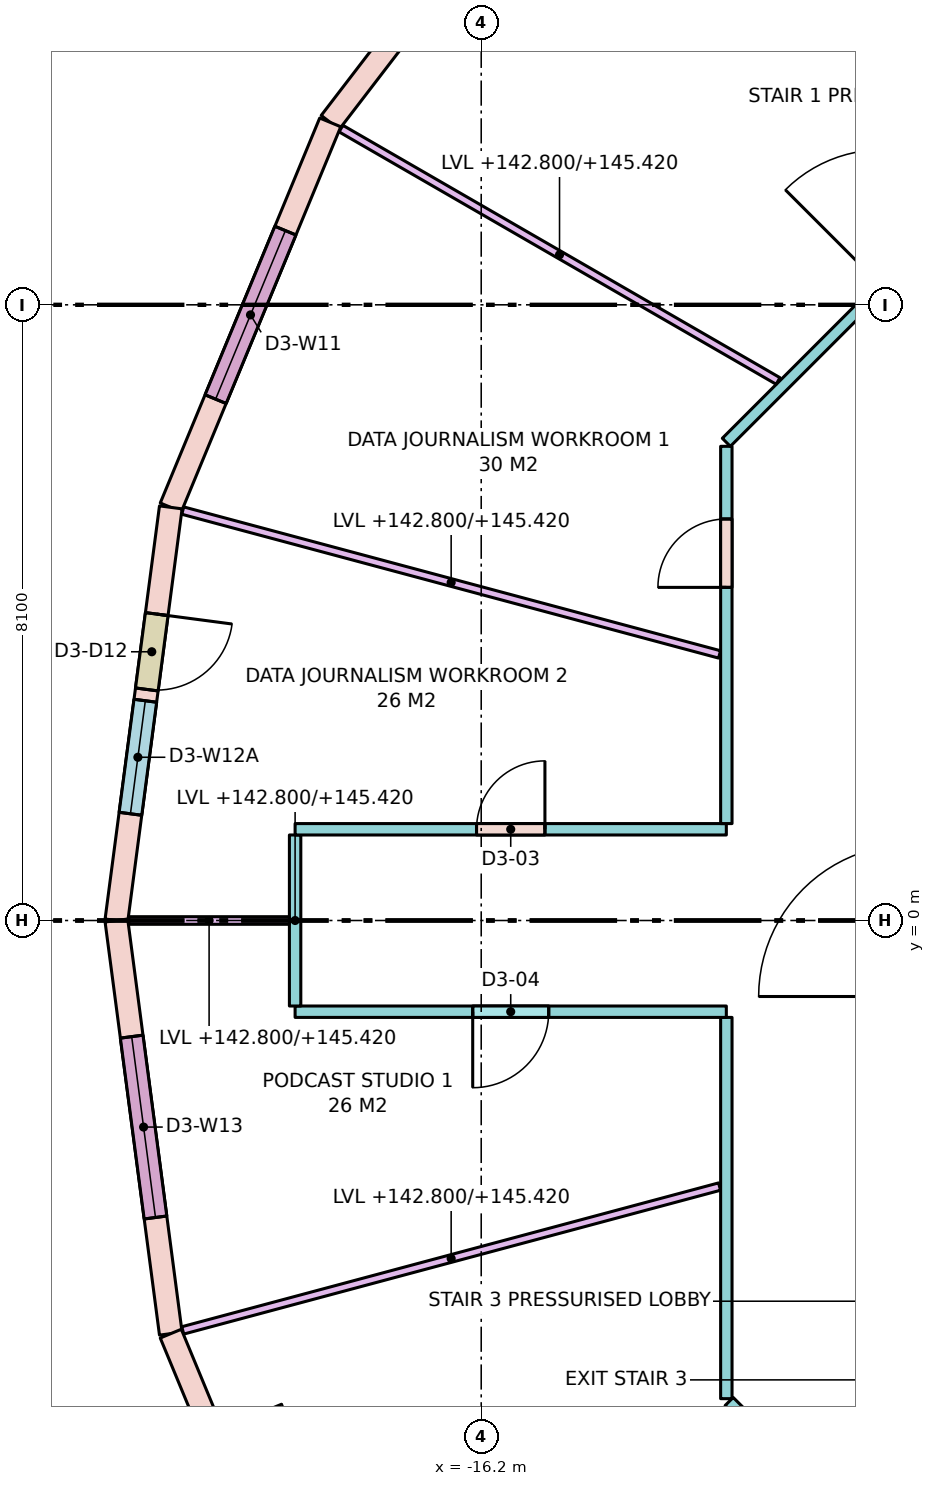
"""IFC4 building model, lengths in metres.
Left out: names, types, materials, properties, quantities, classifications, styles, units other than length and angle.
Written with IfcOpenShell. Run it as: python <this file> out.ifc"""

import sys

from ifc_helpers import new_model, si_unit, direction, frame, frame_2d, origin, place, context, subcontext, project, spatial, rectangle, extrude, element, fill, save


model = new_model("IFC4")
c1 = context("Model", 3, precision=1e-05, world=origin(), true_north=direction((0.0, 1.0)))
c2 = subcontext(c1, "Body", "Model", "MODEL_VIEW")
j1 = project(units=[si_unit("LENGTHUNIT", "METRE"), si_unit("PLANEANGLEUNIT", "RADIAN")], contexts=[c1])
p1 = place(None, origin())
s1 = spatial("IfcSite", under=j1, at=p1, CompositionType="ELEMENT")
p2 = place(p1, origin())
s2 = spatial("IfcBuilding", under=s1, at=p2, CompositionType="ELEMENT")
p3 = place(p2, frame((0.0, 0.0, 142.8)))
s3 = spatial("IfcBuildingStorey", under=s2, at=p3, CompositionType="ELEMENT", Elevation=142.8)
p4 = place(p3, frame((-14.849, 14.849, 0.0), z_axis=(0.0, 0.0, 1.0), x_axis=(-0.608784891166, -0.793335336593, 0.0)))
e1 = element("IfcWall", 1, at=p4, inside=s3, PredefinedType="STANDARD", context=c2, shape_type="SweptSolid", body=[
    extrude(rectangle(XDim=5.482, YDim=0.3, at=frame_2d((2.741, 0.0))), origin(), (0.0, 0.0, 1.0), 3.52),
])
p5 = place(p4, frame((1.416, 0.0, 0.0)))
e2 = element("IfcOpeningElement", 2, at=p5, cuts=e1, PredefinedType="OPENING", context=c2, shape_type="SweptSolid", body=[
    extrude(rectangle(XDim=1.0, YDim=2.4, at=frame_2d((0.5, 1.2))), frame((0.0, 0.16, 0.0), z_axis=(0.0, -1.0, 0.0), x_axis=(1.0, 0.0, 0.0)), (0.0, 0.0, 1.0), 0.32),
])
p6 = place(p4, frame((2.566, 0.0, 0.8)))
e3 = element("IfcOpeningElement", 3, at=p6, cuts=e1, PredefinedType="OPENING", context=c2, shape_type="SweptSolid", body=[
    extrude(rectangle(XDim=1.5, YDim=2.5, at=frame_2d((0.75, 1.25))), frame((0.0, 0.16, 0.0), z_axis=(0.0, -1.0, 0.0), x_axis=(1.0, 0.0, 0.0)), (0.0, 0.0, 1.0), 0.32),
])
p7 = place(p3, frame((-18.187, 10.5, 0.0), z_axis=(0.0, 0.0, 1.0), x_axis=(-0.382688740813, -0.923877333662, 0.0)))
e4 = element("IfcWall", 4, at=p7, inside=s3, PredefinedType="STANDARD", context=c2, shape_type="SweptSolid", body=[
    extrude(rectangle(XDim=5.482, YDim=0.3, at=frame_2d((2.741, 0.0))), origin(), (0.0, 0.0, 1.0), 3.52),
])
p8 = place(p7, frame((1.541, 0.0, 0.8)))
e5 = element("IfcOpeningElement", 5, at=p8, cuts=e4, PredefinedType="OPENING", context=c2, shape_type="SweptSolid", body=[
    extrude(rectangle(XDim=2.4, YDim=2.5, at=frame_2d((1.2, 1.25))), frame((0.0, 0.16, 0.0), z_axis=(0.0, -1.0, 0.0), x_axis=(1.0, 0.0, 0.0)), (0.0, 0.0, 1.0), 0.32),
])
p9 = place(p3, frame((-20.284, 5.435, 0.0), z_axis=(0.0, 0.0, 1.0), x_axis=(-0.130527087244, -0.991444743541, 0.0)))
e6 = element("IfcWall", 6, at=p9, inside=s3, PredefinedType="STANDARD", context=c2, shape_type="SweptSolid", body=[
    extrude(rectangle(XDim=5.482, YDim=0.3, at=frame_2d((2.741, 0.0))), origin(), (0.0, 0.0, 1.0), 3.52),
])
p10 = place(p9, frame((1.416, 0.0, 0.0)))
e7 = element("IfcOpeningElement", 7, at=p10, cuts=e6, PredefinedType="OPENING", context=c2, shape_type="SweptSolid", body=[
    extrude(rectangle(XDim=1.0, YDim=2.4, at=frame_2d((0.5, 1.2))), frame((0.0, 0.16, 0.0), z_axis=(0.0, -1.0, 0.0), x_axis=(1.0, 0.0, 0.0)), (0.0, 0.0, 1.0), 0.32),
])
p11 = place(p9, frame((2.566, 0.0, 0.8)))
e8 = element("IfcOpeningElement", 8, at=p11, cuts=e6, PredefinedType="OPENING", context=c2, shape_type="SweptSolid", body=[
    extrude(rectangle(XDim=1.5, YDim=2.5, at=frame_2d((0.75, 1.25))), frame((0.0, 0.16, 0.0), z_axis=(0.0, -1.0, 0.0), x_axis=(1.0, 0.0, 0.0)), (0.0, 0.0, 1.0), 0.32),
])
p12 = place(p3, frame((-21.0, 0.0, 0.0), z_axis=(0.0, 0.0, 1.0), x_axis=(0.130527087244, -0.991444743541, 0.0)))
e9 = element("IfcWall", 9, at=p12, inside=s3, PredefinedType="STANDARD", context=c2, shape_type="SweptSolid", body=[
    extrude(rectangle(XDim=5.482, YDim=0.3, at=frame_2d((2.741, 0.0))), origin(), (0.0, 0.0, 1.0), 3.52),
])
p13 = place(p12, frame((1.541, 0.0, 0.8)))
e10 = element("IfcOpeningElement", 10, at=p13, cuts=e9, PredefinedType="OPENING", context=c2, shape_type="SweptSolid", body=[
    extrude(rectangle(XDim=2.4, YDim=2.5, at=frame_2d((1.2, 1.25))), frame((0.0, 0.16, 0.0), z_axis=(0.0, -1.0, 0.0), x_axis=(1.0, 0.0, 0.0)), (0.0, 0.0, 1.0), 0.32),
])
p14 = place(p3, frame((-20.284, -5.435, 0.0), z_axis=(0.0, 0.0, 1.0), x_axis=(0.382688740813, -0.923877333662, 0.0)))
e11 = element("IfcWall", 11, at=p14, inside=s3, PredefinedType="STANDARD", context=c2, shape_type="SweptSolid", body=[
    extrude(rectangle(XDim=5.482, YDim=0.3, at=frame_2d((2.741, 0.0))), origin(), (0.0, 0.0, 1.0), 3.52),
])
p15 = place(p14, frame((1.416, 0.0, 0.0)))
e12 = element("IfcOpeningElement", 12, at=p15, cuts=e11, PredefinedType="OPENING", context=c2, shape_type="SweptSolid", body=[
    extrude(rectangle(XDim=1.0, YDim=2.4, at=frame_2d((0.5, 1.2))), frame((0.0, 0.16, 0.0), z_axis=(0.0, -1.0, 0.0), x_axis=(1.0, 0.0, 0.0)), (0.0, 0.0, 1.0), 0.32),
])
p16 = place(p14, frame((2.566, 0.0, 0.8)))
e13 = element("IfcOpeningElement", 13, at=p16, cuts=e11, PredefinedType="OPENING", context=c2, shape_type="SweptSolid", body=[
    extrude(rectangle(XDim=1.5, YDim=2.5, at=frame_2d((0.75, 1.25))), frame((0.0, 0.16, 0.0), z_axis=(0.0, -1.0, 0.0), x_axis=(1.0, 0.0, 0.0)), (0.0, 0.0, 1.0), 0.32),
])
p17 = place(p3, frame((-10.534, -8.731, 0.0), z_axis=(0.0, 0.0, 1.0), x_axis=(-0.707106781187, 0.707106781187, 0.0)))
e14 = element("IfcWall", 14, at=p17, inside=s3, PredefinedType="PARTITIONING", context=c2, shape_type="SweptSolid", body=[
    extrude(rectangle(XDim=3.399, YDim=0.15, at=frame_2d((1.7, 0.0))), origin(), (0.0, 0.0, 1.0), 2.62),
])
p18 = place(p3, frame((-12.975, -6.291, 0.0), z_axis=(0.0, 0.0, 1.0), x_axis=(0.0, 1.0, 0.0)))
e15 = element("IfcWall", 15, at=p18, inside=s3, PredefinedType="PARTITIONING", context=c2, shape_type="SweptSolid", body=[
    extrude(rectangle(XDim=5.016, YDim=0.15, at=frame_2d((2.508, 0.0))), origin(), (0.0, 0.0, 1.0), 2.62),
])
p19 = place(p3, frame((-12.975, -1.2, 0.0), z_axis=(0.0, 0.0, 1.0), x_axis=(-1.0, 0.0, 0.0)))
e16 = element("IfcWall", 16, at=p19, inside=s3, PredefinedType="PARTITIONING", context=c2, shape_type="SweptSolid", body=[
    extrude(rectangle(XDim=5.674, YDim=0.15, at=frame_2d((2.837, 0.0))), origin(), (0.0, 0.0, 1.0), 3.52),
])
p20 = place(p19, frame((2.337, 0.0, 0.0)))
e17 = element("IfcOpeningElement", 17, at=p20, cuts=e16, PredefinedType="OPENING", context=c2, shape_type="SweptSolid", body=[
    extrude(rectangle(XDim=1.0, YDim=2.1, at=frame_2d((0.5, 1.05))), frame((0.0, 0.085, 0.0), z_axis=(0.0, -1.0, 0.0), x_axis=(1.0, 0.0, 0.0)), (0.0, 0.0, 1.0), 0.17),
])
p21 = place(p3, frame((-18.649, -1.125, 0.0), z_axis=(0.0, 0.0, 1.0), x_axis=(0.0, 1.0, 0.0)))
e18 = element("IfcWall", 18, at=p21, inside=s3, PredefinedType="PARTITIONING", context=c2, shape_type="SweptSolid", body=[
    extrude(rectangle(XDim=2.25, YDim=0.15, at=frame_2d((1.125, 0.0))), origin(), (0.0, 0.0, 1.0), 2.62),
])
p22 = place(p3, frame((-18.649, 1.2, 0.0), z_axis=(0.0, 0.0, 1.0), x_axis=(1.0, 0.0, 0.0)))
e19 = element("IfcWall", 19, at=p22, inside=s3, PredefinedType="PARTITIONING", context=c2, shape_type="SweptSolid", body=[
    extrude(rectangle(XDim=5.674, YDim=0.15, at=frame_2d((2.837, 0.0))), origin(), (0.0, 0.0, 1.0), 3.52),
])
p23 = place(p22, frame((2.387, 0.0, 0.0)))
e20 = element("IfcOpeningElement", 20, at=p23, cuts=e19, PredefinedType="OPENING", context=c2, shape_type="SweptSolid", body=[
    extrude(rectangle(XDim=0.9, YDim=2.1, at=frame_2d((0.45, 1.05))), frame((0.0, 0.085, 0.0), z_axis=(0.0, -1.0, 0.0), x_axis=(1.0, 0.0, 0.0)), (0.0, 0.0, 1.0), 0.17),
])
p24 = place(p3, frame((-12.975, 1.275, 0.0), z_axis=(0.0, 0.0, 1.0), x_axis=(0.0, 1.0, 0.0)))
e21 = element("IfcWall", 21, at=p24, inside=s3, PredefinedType="PARTITIONING", context=c2, shape_type="SweptSolid", body=[
    extrude(rectangle(XDim=4.963, YDim=0.15, at=frame_2d((2.482, 0.0))), origin(), (0.0, 0.0, 1.0), 2.62),
])
p25 = place(p24, frame((3.107, 0.0, 0.0)))
e22 = element("IfcOpeningElement", 22, at=p25, cuts=e21, PredefinedType="OPENING", context=c2, shape_type="SweptSolid", body=[
    extrude(rectangle(XDim=0.9, YDim=2.1, at=frame_2d((0.45, 1.05))), frame((0.0, 0.085, 0.0), z_axis=(0.0, -1.0, 0.0), x_axis=(1.0, 0.0, 0.0)), (0.0, 0.0, 1.0), 0.17),
])
p26 = place(p3, frame((-12.975, 6.291, 0.0), z_axis=(0.0, 0.0, 1.0), x_axis=(0.707125355289, 0.707088206597, 0.0)))
e23 = element("IfcWall", 23, at=p26, inside=s3, PredefinedType="PARTITIONING", context=c2, shape_type="SweptSolid", body=[
    extrude(rectangle(XDim=6.572, YDim=0.15, at=frame_2d((3.286, 0.0))), origin(), (0.0, 0.0, 1.0), 2.62),
])
p27 = place(p26, frame((2.898, 0.0, 0.0)))
e24 = element("IfcOpeningElement", 24, at=p27, cuts=e23, PredefinedType="OPENING", context=c2, shape_type="SweptSolid", body=[
    extrude(rectangle(XDim=1.8, YDim=2.1, at=frame_2d((0.9, 1.05))), frame((0.0, 0.085, 0.0), z_axis=(0.0, -1.0, 0.0), x_axis=(1.0, 0.0, 0.0)), (0.0, 0.0, 1.0), 0.17),
])
p28 = place(p3, frame((-12.294, 7.098, 0.0), z_axis=(0.0, 0.0, 1.0), x_axis=(-0.866010486135, 0.500025837236, 0.0)))
e25 = element("IfcWall", 25, at=p28, inside=s3, PredefinedType="PARTITIONING", context=c2, shape_type="SweptSolid", body=[
    extrude(rectangle(XDim=6.641, YDim=0.1, at=frame_2d((3.32, 0.0))), origin(), (0.0, 0.0, 1.0), 2.62),
])
p29 = place(p3, frame((-13.064, 3.5, 0.0), z_axis=(0.0, 0.0, 1.0), x_axis=(-0.965927781613, 0.258811747624, 0.0)))
e26 = element("IfcWall", 26, at=p29, inside=s3, PredefinedType="PARTITIONING", context=c2, shape_type="SweptSolid", body=[
    extrude(rectangle(XDim=7.312, YDim=0.1, at=frame_2d((3.656, 0.0))), origin(), (0.0, 0.0, 1.0), 2.62),
])
p30 = place(p3, frame((-18.724, 0.0, 0.0), z_axis=(0.0, 0.0, 1.0), x_axis=(-1.0, 0.0, 0.0)))
e27 = element("IfcWall", 27, at=p30, inside=s3, PredefinedType="PARTITIONING", context=c2, shape_type="SweptSolid", body=[
    extrude(rectangle(XDim=2.113, YDim=0.1, at=frame_2d((1.057, 0.0))), origin(), (0.0, 0.0, 1.0), 2.62),
])
p31 = place(p3, frame((-13.064, -3.5, 0.0), z_axis=(0.0, 0.0, 1.0), x_axis=(-0.965927781613, -0.258811747624, 0.0)))
e28 = element("IfcWall", 28, at=p31, inside=s3, PredefinedType="PARTITIONING", context=c2, shape_type="SweptSolid", body=[
    extrude(rectangle(XDim=7.312, YDim=0.1, at=frame_2d((3.656, 0.0))), origin(), (0.0, 0.0, 1.0), 2.62),
])
p32 = place(p8, origin())
e29 = element("IfcWindow", 29, at=p32, inside=s3, PartitioningType="SINGLE_PANEL", PredefinedType="WINDOW", context=c2, shape_type="SweptSolid", body=[
    extrude(rectangle(XDim=2.4, YDim=2.5, at=frame_2d((1.2, 1.25))), frame((0.0, 0.03, 0.0), z_axis=(0.0, -1.0, 0.0), x_axis=(1.0, 0.0, 0.0)), (0.0, 0.0, 1.0), 0.06),
])
fill(e5, e29)
p33 = place(p10, origin())
e30 = element("IfcDoor", 30, at=p33, inside=s3, OperationType="SINGLE_SWING_LEFT", PredefinedType="DOOR", context=c2, shape_type="SweptSolid", body=[
    extrude(rectangle(XDim=1.0, YDim=2.4, at=frame_2d((0.5, 1.2))), frame((0.0, 0.025, 0.0), z_axis=(0.0, -1.0, 0.0), x_axis=(1.0, 0.0, 0.0)), (0.0, 0.0, 1.0), 0.05),
])
fill(e7, e30)
p34 = place(p11, origin())
e31 = element("IfcWindow", 31, at=p34, inside=s3, PartitioningType="SINGLE_PANEL", PredefinedType="WINDOW", context=c2, shape_type="SweptSolid", body=[
    extrude(rectangle(XDim=1.5, YDim=2.5, at=frame_2d((0.75, 1.25))), frame((0.0, 0.03, 0.0), z_axis=(0.0, -1.0, 0.0), x_axis=(1.0, 0.0, 0.0)), (0.0, 0.0, 1.0), 0.06),
])
fill(e8, e31)
p35 = place(p13, origin())
e32 = element("IfcWindow", 32, at=p35, inside=s3, PartitioningType="SINGLE_PANEL", PredefinedType="WINDOW", context=c2, shape_type="SweptSolid", body=[
    extrude(rectangle(XDim=2.4, YDim=2.5, at=frame_2d((1.2, 1.25))), frame((0.0, 0.03, 0.0), z_axis=(0.0, -1.0, 0.0), x_axis=(1.0, 0.0, 0.0)), (0.0, 0.0, 1.0), 0.06),
])
fill(e10, e32)
p36 = place(p25, origin())
e33 = element("IfcDoor", 33, at=p36, inside=s3, OperationType="SINGLE_SWING_LEFT", PredefinedType="DOOR", context=c2, shape_type="SweptSolid", body=[
    extrude(rectangle(XDim=0.9, YDim=2.1, at=frame_2d((0.45, 1.05))), frame((0.0, 0.025, 0.0), z_axis=(0.0, -1.0, 0.0), x_axis=(1.0, 0.0, 0.0)), (0.0, 0.0, 1.0), 0.05),
])
fill(e22, e33)
p37 = place(p23, origin())
e34 = element("IfcDoor", 34, at=p37, inside=s3, OperationType="SINGLE_SWING_RIGHT", PredefinedType="DOOR", context=c2, shape_type="SweptSolid", body=[
    extrude(rectangle(XDim=0.9, YDim=2.1, at=frame_2d((0.45, 1.05))), frame((0.0, 0.025, 0.0), z_axis=(0.0, -1.0, 0.0), x_axis=(1.0, 0.0, 0.0)), (0.0, 0.0, 1.0), 0.05),
])
fill(e20, e34)
p38 = place(p20, origin())
e35 = element("IfcDoor", 35, at=p38, inside=s3, OperationType="SINGLE_SWING_RIGHT", PredefinedType="DOOR", context=c2, shape_type="SweptSolid", body=[
    extrude(rectangle(XDim=1.0, YDim=2.1, at=frame_2d((0.5, 1.05))), frame((0.0, 0.025, 0.0), z_axis=(0.0, -1.0, 0.0), x_axis=(1.0, 0.0, 0.0)), (0.0, 0.0, 1.0), 0.05),
])
fill(e17, e35)
save(model, sys.argv[1])
